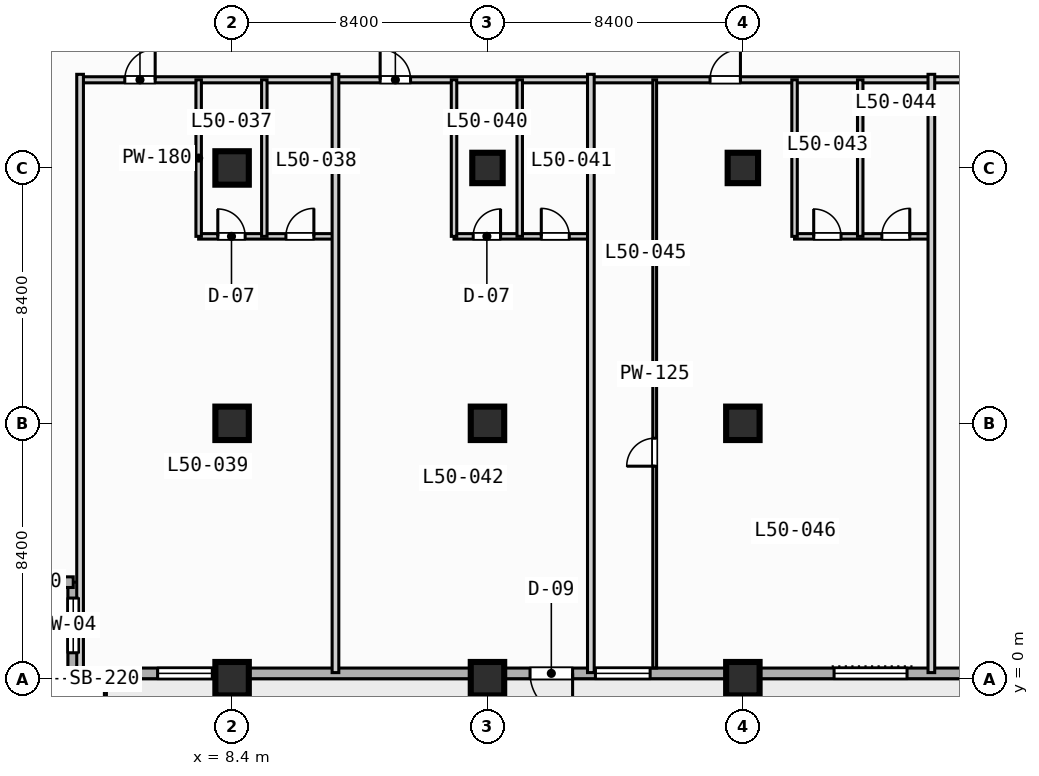
"""IFC4 building model, lengths in metres.
Left out: names, types, materials, properties, quantities, classifications, styles, units other than length and angle.
Written with IfcOpenShell. Run it as: python <this file> out.ifc"""

import sys

from ifc_helpers import new_model, si_unit, direction, frame, frame_2d, origin, origin_2d, place, context, subcontext, project, spatial, rectangle, extrude, element, fill, save


model = new_model("IFC4")
c1 = context("Model", 3, precision=1e-05, world=origin(), true_north=direction((0.0, 1.0)))
c2 = subcontext(c1, "Body", "Model", "MODEL_VIEW")
j1 = project(units=[si_unit("LENGTHUNIT", "METRE"), si_unit("PLANEANGLEUNIT", "RADIAN")], contexts=[c1])
p1 = place(None, origin())
s1 = spatial("IfcSite", under=j1, at=p1, CompositionType="ELEMENT")
p2 = place(p1, origin())
s2 = spatial("IfcBuilding", under=s1, at=p2, CompositionType="ELEMENT")
p3 = place(p2, frame((0.0, 0.0, 205.0)))
s3 = spatial("IfcBuildingStorey", under=s2, at=p3, CompositionType="ELEMENT", Elevation=205.0)
for number, where, z_axis, x_axis in (
    (1, (8.4, 0.0, 0.0), (0.0, 0.0, 1.0), (1.0, 0.0, 0.0)),
    (2, (8.4, 8.4, 0.0), (0.0, 0.0, 1.0), (1.0, 0.0, 0.0)),
    (3, (8.4, 16.8, 0.0), (0.0, 0.0, 1.0), (1.0, 0.0, 0.0)),
    (4, (16.8, 0.0, 0.0), (0.0, 0.0, 1.0), (1.0, 0.0, 0.0)),
    (5, (16.8, 8.4, 0.0), (0.0, 0.0, 1.0), (1.0, 0.0, 0.0)),
):
    element("IfcColumn", number, at=place(p3, frame(where, z_axis=z_axis, x_axis=x_axis)), inside=s3, PredefinedType="COLUMN", context=c2, shape_type="SweptSolid", body=[
        extrude(rectangle(XDim=1.1, YDim=1.1, at=origin_2d()), origin(), (0.0, 0.0, 1.0), 3.7),
    ])
p4 = place(p3, frame((16.8, 16.8, 0.0), z_axis=(0.0, 0.0, 1.0), x_axis=(1.0, 0.0, 0.0)))
e6 = element("IfcColumn", 6, at=p4, inside=s3, PredefinedType="COLUMN", context=c2, shape_type="SweptSolid", body=[
    extrude(rectangle(XDim=1.0, YDim=1.0, at=origin_2d()), origin(), (0.0, 0.0, 1.0), 3.7),
])
for number, where, z_axis, x_axis in (
    (7, (25.2, 0.0, 0.0), (0.0, 0.0, 1.0), (1.0, 0.0, 0.0)),
    (8, (25.2, 8.4, 0.0), (0.0, 0.0, 1.0), (1.0, 0.0, 0.0)),
):
    element("IfcColumn", number, at=place(p3, frame(where, z_axis=z_axis, x_axis=x_axis)), inside=s3, PredefinedType="COLUMN", context=c2, shape_type="SweptSolid", body=[
        extrude(rectangle(XDim=1.1, YDim=1.1, at=origin_2d()), origin(), (0.0, 0.0, 1.0), 3.7),
    ])
p5 = place(p3, frame((25.2, 16.8, 0.0), z_axis=(0.0, 0.0, 1.0), x_axis=(1.0, 0.0, 0.0)))
e9 = element("IfcColumn", 9, at=p5, inside=s3, PredefinedType="COLUMN", context=c2, shape_type="SweptSolid", body=[
    extrude(rectangle(XDim=1.0, YDim=1.0, at=origin_2d()), origin(), (0.0, 0.0, 1.0), 3.7),
])
p6 = place(p3, frame((3.175, 0.175, 0.0), z_axis=(0.0, 0.0, 1.0), x_axis=(0.0, 1.0, 0.0)))
e10 = element("IfcWall", 10, at=p6, inside=s3, PredefinedType="STANDARD", context=c2, shape_type="SweptSolid", body=[
    extrude(rectangle(XDim=3.0, YDim=0.35, at=frame_2d((1.5, 0.0))), origin(), (0.0, 0.0, 1.0), 3.47),
])
p7 = place(p6, frame((0.677, 0.0, 0.85)))
e11 = element("IfcOpeningElement", 11, at=p7, cuts=e10, PredefinedType="OPENING", context=c2, shape_type="SweptSolid", body=[
    extrude(rectangle(XDim=1.8, YDim=1.8, at=frame_2d((0.9, 0.9))), frame((0.0, 0.185, 0.0), z_axis=(0.0, -1.0, 0.0), x_axis=(1.0, 0.0, 0.0)), (0.0, 0.0, 1.0), 0.37),
])
p8 = place(p3, frame((3.175, 3.175, 0.0), z_axis=(0.0, 0.0, 1.0), x_axis=(-1.0, 0.0, 0.0)))
e12 = element("IfcWall", 12, at=p8, inside=s3, PredefinedType="STANDARD", context=c2, shape_type="SweptSolid", body=[
    extrude(rectangle(XDim=3.0, YDim=0.35, at=frame_2d((1.5, 0.0))), origin(), (0.0, 0.0, 1.0), 3.47),
])
p9 = place(p3, frame((72.425, 0.175, 0.0), z_axis=(0.0, 0.0, 1.0), x_axis=(-1.0, 0.0, 0.0)))
e13 = element("IfcWall", 13, at=p9, inside=s3, PredefinedType="STANDARD", context=c2, shape_type="SweptSolid", body=[
    extrude(rectangle(XDim=69.25, YDim=0.35, at=frame_2d((34.625, 0.0))), origin(), (0.0, 0.0, 1.0), 3.47),
])
p10 = place(p9, frame((52.825, 0.0, 0.0)))
e14 = element("IfcOpeningElement", 14, at=p10, cuts=e13, PredefinedType="OPENING", context=c2, shape_type="SweptSolid", body=[
    extrude(rectangle(XDim=1.4, YDim=2.2, at=frame_2d((0.7, 1.1))), frame((0.0, 0.185, 0.0), z_axis=(0.0, -1.0, 0.0), x_axis=(1.0, 0.0, 0.0)), (0.0, 0.0, 1.0), 0.37),
])
p11 = place(p9, frame((41.825, 0.0, 0.85)))
e15 = element("IfcOpeningElement", 15, at=p11, cuts=e13, PredefinedType="OPENING", context=c2, shape_type="SweptSolid", body=[
    extrude(rectangle(XDim=2.4, YDim=1.95, at=frame_2d((1.2, 0.975))), frame((0.0, 0.185, 0.0), z_axis=(0.0, -1.0, 0.0), x_axis=(1.0, 0.0, 0.0)), (0.0, 0.0, 1.0), 0.37),
])
p12 = place(p9, frame((33.725, 0.0, 0.85)))
e16 = element("IfcOpeningElement", 16, at=p12, cuts=e13, PredefinedType="OPENING", context=c2, shape_type="SweptSolid", body=[
    extrude(rectangle(XDim=1.8, YDim=1.8, at=frame_2d((0.9, 0.9))), frame((0.0, 0.185, 0.0), z_axis=(0.0, -1.0, 0.0), x_axis=(1.0, 0.0, 0.0)), (0.0, 0.0, 1.0), 0.37),
])
p13 = place(p9, frame((25.025, 0.0, 0.85)))
e17 = element("IfcOpeningElement", 17, at=p13, cuts=e13, PredefinedType="OPENING", context=c2, shape_type="SweptSolid", body=[
    extrude(rectangle(XDim=2.4, YDim=1.95, at=frame_2d((1.2, 0.975))), frame((0.0, 0.185, 0.0), z_axis=(0.0, -1.0, 0.0), x_axis=(1.0, 0.0, 0.0)), (0.0, 0.0, 1.0), 0.37),
])
p14 = place(p9, frame((64.675, 0.0, 0.85)))
e18 = element("IfcOpeningElement", 18, at=p14, cuts=e13, PredefinedType="OPENING", context=c2, shape_type="SweptSolid", body=[
    extrude(rectangle(XDim=1.8, YDim=1.8, at=frame_2d((0.9, 0.9))), frame((0.0, 0.185, 0.0), z_axis=(0.0, -1.0, 0.0), x_axis=(1.0, 0.0, 0.0)), (0.0, 0.0, 1.0), 0.37),
])
p15 = place(p9, frame((50.275, 0.0, 0.85)))
e19 = element("IfcOpeningElement", 19, at=p15, cuts=e13, PredefinedType="OPENING", context=c2, shape_type="SweptSolid", body=[
    extrude(rectangle(XDim=1.8, YDim=1.8, at=frame_2d((0.9, 0.9))), frame((0.0, 0.185, 0.0), z_axis=(0.0, -1.0, 0.0), x_axis=(1.0, 0.0, 0.0)), (0.0, 0.0, 1.0), 0.37),
])
p16 = place(p3, frame((3.4, 19.7, 0.0), z_axis=(0.0, 0.0, 1.0), x_axis=(1.0, 0.0, 0.0)))
e20 = element("IfcWall", 20, at=p16, inside=s3, PredefinedType="PARTITIONING", context=c2, shape_type="SweptSolid", body=[
    extrude(rectangle(XDim=35.8, YDim=0.2, at=frame_2d((17.9, 0.0))), origin(), (0.0, 0.0, 1.0), 3.47),
])
p17 = place(p16, frame((1.47, 0.0, 0.0)))
e21 = element("IfcOpeningElement", 21, at=p17, cuts=e20, PredefinedType="OPENING", context=c2, shape_type="SweptSolid", body=[
    extrude(rectangle(XDim=1.0, YDim=2.15, at=frame_2d((0.5, 1.075))), frame((0.0, 0.11, 0.0), z_axis=(0.0, -1.0, 0.0), x_axis=(1.0, 0.0, 0.0)), (0.0, 0.0, 1.0), 0.22),
])
p18 = place(p16, frame((9.87, 0.0, 0.0)))
e22 = element("IfcOpeningElement", 22, at=p18, cuts=e20, PredefinedType="OPENING", context=c2, shape_type="SweptSolid", body=[
    extrude(rectangle(XDim=1.0, YDim=2.15, at=frame_2d((0.5, 1.075))), frame((0.0, 0.11, 0.0), z_axis=(0.0, -1.0, 0.0), x_axis=(1.0, 0.0, 0.0)), (0.0, 0.0, 1.0), 0.22),
])
p19 = place(p16, frame((20.72, 0.0, 0.0)))
e23 = element("IfcOpeningElement", 23, at=p19, cuts=e20, PredefinedType="OPENING", context=c2, shape_type="SweptSolid", body=[
    extrude(rectangle(XDim=1.0, YDim=2.15, at=frame_2d((0.5, 1.075))), frame((0.0, 0.11, 0.0), z_axis=(0.0, -1.0, 0.0), x_axis=(1.0, 0.0, 0.0)), (0.0, 0.0, 1.0), 0.22),
])
p20 = place(p16, frame((29.17, 0.0, 0.0)))
e24 = element("IfcOpeningElement", 24, at=p20, cuts=e20, PredefinedType="OPENING", context=c2, shape_type="SweptSolid", body=[
    extrude(rectangle(XDim=1.0, YDim=2.15, at=frame_2d((0.5, 1.075))), frame((0.0, 0.11, 0.0), z_axis=(0.0, -1.0, 0.0), x_axis=(1.0, 0.0, 0.0)), (0.0, 0.0, 1.0), 0.22),
])
p21 = place(p3, frame((3.4, 0.2, 0.0), z_axis=(0.0, 0.0, 1.0), x_axis=(0.0, 1.0, 0.0)))
e25 = element("IfcWall", 25, at=p21, inside=s3, PredefinedType="PARTITIONING", context=c2, shape_type="SweptSolid", body=[
    extrude(rectangle(XDim=19.68, YDim=0.22, at=frame_2d((9.84, 0.0))), origin(), (0.0, 0.0, 1.0), 3.47),
])
p22 = place(p3, frame((7.3, 14.55, 0.0), z_axis=(0.0, 0.0, 1.0), x_axis=(1.0, 0.0, 0.0)))
e26 = element("IfcWall", 26, at=p22, inside=s3, PredefinedType="PLUMBINGWALL", context=c2, shape_type="SweptSolid", body=[
    extrude(rectangle(XDim=4.5, YDim=0.18, at=frame_2d((2.25, 0.0))), origin(), (0.0, 0.0, 1.0), 3.47),
])
p23 = place(p22, frame((0.63, 0.0, 0.0)))
e27 = element("IfcOpeningElement", 27, at=p23, cuts=e26, PredefinedType="OPENING", context=c2, shape_type="SweptSolid", body=[
    extrude(rectangle(XDim=0.9, YDim=2.1, at=frame_2d((0.45, 1.05))), frame((0.0, 0.1, 0.0), z_axis=(0.0, -1.0, 0.0), x_axis=(1.0, 0.0, 0.0)), (0.0, 0.0, 1.0), 0.2),
])
p24 = place(p22, frame((2.87, 0.0, 0.0)))
e28 = element("IfcOpeningElement", 28, at=p24, cuts=e26, PredefinedType="OPENING", context=c2, shape_type="SweptSolid", body=[
    extrude(rectangle(XDim=0.92, YDim=2.1, at=frame_2d((0.46, 1.05))), frame((0.0, 0.1, 0.0), z_axis=(0.0, -1.0, 0.0), x_axis=(1.0, 0.0, 0.0)), (0.0, 0.0, 1.0), 0.2),
])
for number, where, z_axis, x_axis in (
    (29, (7.3, 14.55, 0.0), (0.0, 0.0, 1.0), (0.0, 1.0, 0.0)),
    (30, (9.46, 14.55, 0.0), (0.0, 0.0, 1.0), (0.0, 1.0, 0.0)),
):
    element("IfcWall", number, at=place(p3, frame(where, z_axis=z_axis, x_axis=x_axis)), inside=s3, PredefinedType="PLUMBINGWALL", context=c2, shape_type="SweptSolid", body=[
        extrude(rectangle(XDim=5.15, YDim=0.18, at=frame_2d((2.575, 0.0))), origin(), (0.0, 0.0, 1.0), 3.47),
    ])
p25 = place(p3, frame((11.8, 0.2, 0.0), z_axis=(0.0, 0.0, 1.0), x_axis=(0.0, 1.0, 0.0)))
e31 = element("IfcWall", 31, at=p25, inside=s3, PredefinedType="PARTITIONING", context=c2, shape_type="SweptSolid", body=[
    extrude(rectangle(XDim=19.68, YDim=0.22, at=frame_2d((9.84, 0.0))), origin(), (0.0, 0.0, 1.0), 3.47),
])
p26 = place(p3, frame((15.7, 14.55, 0.0), z_axis=(0.0, 0.0, 1.0), x_axis=(1.0, 0.0, 0.0)))
e32 = element("IfcWall", 32, at=p26, inside=s3, PredefinedType="PLUMBINGWALL", context=c2, shape_type="SweptSolid", body=[
    extrude(rectangle(XDim=4.5, YDim=0.18, at=frame_2d((2.25, 0.0))), origin(), (0.0, 0.0, 1.0), 3.47),
])
p27 = place(p26, frame((0.63, 0.0, 0.0)))
e33 = element("IfcOpeningElement", 33, at=p27, cuts=e32, PredefinedType="OPENING", context=c2, shape_type="SweptSolid", body=[
    extrude(rectangle(XDim=0.9, YDim=2.1, at=frame_2d((0.45, 1.05))), frame((0.0, 0.1, 0.0), z_axis=(0.0, -1.0, 0.0), x_axis=(1.0, 0.0, 0.0)), (0.0, 0.0, 1.0), 0.2),
])
p28 = place(p26, frame((2.87, 0.0, 0.0)))
e34 = element("IfcOpeningElement", 34, at=p28, cuts=e32, PredefinedType="OPENING", context=c2, shape_type="SweptSolid", body=[
    extrude(rectangle(XDim=0.92, YDim=2.1, at=frame_2d((0.46, 1.05))), frame((0.0, 0.1, 0.0), z_axis=(0.0, -1.0, 0.0), x_axis=(1.0, 0.0, 0.0)), (0.0, 0.0, 1.0), 0.2),
])
for number, where, z_axis, x_axis in (
    (35, (15.7, 14.55, 0.0), (0.0, 0.0, 1.0), (0.0, 1.0, 0.0)),
    (36, (17.86, 14.55, 0.0), (0.0, 0.0, 1.0), (0.0, 1.0, 0.0)),
):
    element("IfcWall", number, at=place(p3, frame(where, z_axis=z_axis, x_axis=x_axis)), inside=s3, PredefinedType="PLUMBINGWALL", context=c2, shape_type="SweptSolid", body=[
        extrude(rectangle(XDim=5.15, YDim=0.18, at=frame_2d((2.575, 0.0))), origin(), (0.0, 0.0, 1.0), 3.47),
    ])
p29 = place(p3, frame((20.2, 0.2, 0.0), z_axis=(0.0, 0.0, 1.0), x_axis=(0.0, 1.0, 0.0)))
e37 = element("IfcWall", 37, at=p29, inside=s3, PredefinedType="PARTITIONING", context=c2, shape_type="SweptSolid", body=[
    extrude(rectangle(XDim=19.68, YDim=0.22, at=frame_2d((9.84, 0.0))), origin(), (0.0, 0.0, 1.0), 3.47),
])
p30 = place(p3, frame((26.9, 14.55, 0.0), z_axis=(0.0, 0.0, 1.0), x_axis=(1.0, 0.0, 0.0)))
e38 = element("IfcWall", 38, at=p30, inside=s3, PredefinedType="PLUMBINGWALL", context=c2, shape_type="SweptSolid", body=[
    extrude(rectangle(XDim=4.5, YDim=0.18, at=frame_2d((2.25, 0.0))), origin(), (0.0, 0.0, 1.0), 3.47),
])
p31 = place(p30, frame((0.63, 0.0, 0.0)))
e39 = element("IfcOpeningElement", 39, at=p31, cuts=e38, PredefinedType="OPENING", context=c2, shape_type="SweptSolid", body=[
    extrude(rectangle(XDim=0.9, YDim=2.1, at=frame_2d((0.45, 1.05))), frame((0.0, 0.1, 0.0), z_axis=(0.0, -1.0, 0.0), x_axis=(1.0, 0.0, 0.0)), (0.0, 0.0, 1.0), 0.2),
])
p32 = place(p30, frame((2.87, 0.0, 0.0)))
e40 = element("IfcOpeningElement", 40, at=p32, cuts=e38, PredefinedType="OPENING", context=c2, shape_type="SweptSolid", body=[
    extrude(rectangle(XDim=0.92, YDim=2.1, at=frame_2d((0.46, 1.05))), frame((0.0, 0.1, 0.0), z_axis=(0.0, -1.0, 0.0), x_axis=(1.0, 0.0, 0.0)), (0.0, 0.0, 1.0), 0.2),
])
for number, where, z_axis, x_axis in (
    (41, (26.9, 14.55, 0.0), (0.0, 0.0, 1.0), (0.0, 1.0, 0.0)),
    (42, (29.06, 14.55, 0.0), (0.0, 0.0, 1.0), (0.0, 1.0, 0.0)),
):
    element("IfcWall", number, at=place(p3, frame(where, z_axis=z_axis, x_axis=x_axis)), inside=s3, PredefinedType="PLUMBINGWALL", context=c2, shape_type="SweptSolid", body=[
        extrude(rectangle(XDim=5.15, YDim=0.18, at=frame_2d((2.575, 0.0))), origin(), (0.0, 0.0, 1.0), 3.47),
    ])
p33 = place(p3, frame((22.3, 0.35, 0.0), z_axis=(0.0, 0.0, 1.0), x_axis=(0.0, 1.0, 0.0)))
e43 = element("IfcWall", 43, at=p33, inside=s3, PredefinedType="PARTITIONING", context=c2, shape_type="SweptSolid", body=[
    extrude(rectangle(XDim=19.35, YDim=0.125, at=frame_2d((9.675, 0.0))), origin(), (0.0, 0.0, 1.0), 3.47),
])
p34 = place(p33, frame((6.64, 0.0, 0.0)))
e44 = element("IfcOpeningElement", 44, at=p34, cuts=e43, PredefinedType="OPENING", context=c2, shape_type="SweptSolid", body=[
    extrude(rectangle(XDim=0.92, YDim=2.1, at=frame_2d((0.46, 1.05))), frame((0.0, 0.073, 0.0), z_axis=(0.0, -1.0, 0.0), x_axis=(1.0, 0.0, 0.0)), (0.0, 0.0, 1.0), 0.145),
])
p35 = place(p3, frame((31.4, 0.2, 0.0), z_axis=(0.0, 0.0, 1.0), x_axis=(0.0, 1.0, 0.0)))
e45 = element("IfcWall", 45, at=p35, inside=s3, PredefinedType="PARTITIONING", context=c2, shape_type="SweptSolid", body=[
    extrude(rectangle(XDim=19.68, YDim=0.22, at=frame_2d((9.84, 0.0))), origin(), (0.0, 0.0, 1.0), 3.47),
])
p36 = place(p7, origin())
e46 = element("IfcWindow", 46, at=p36, inside=s3, PartitioningType="SINGLE_PANEL", PredefinedType="WINDOW", context=c2, shape_type="SweptSolid", body=[
    extrude(rectangle(XDim=1.8, YDim=1.8, at=frame_2d((0.9, 0.9))), frame((0.0, 0.03, 0.0), z_axis=(0.0, -1.0, 0.0), x_axis=(1.0, 0.0, 0.0)), (0.0, 0.0, 1.0), 0.06),
])
fill(e11, e46)
p37 = place(p10, origin())
e47 = element("IfcDoor", 47, at=p37, inside=s3, OperationType="SINGLE_SWING_LEFT", PredefinedType="DOOR", context=c2, shape_type="SweptSolid", body=[
    extrude(rectangle(XDim=1.4, YDim=2.2, at=frame_2d((0.7, 1.1))), frame((0.0, 0.025, 0.0), z_axis=(0.0, -1.0, 0.0), x_axis=(1.0, 0.0, 0.0)), (0.0, 0.0, 1.0), 0.05),
])
fill(e14, e47)
p38 = place(p11, origin())
e48 = element("IfcWindow", 48, at=p38, inside=s3, PartitioningType="SINGLE_PANEL", PredefinedType="WINDOW", context=c2, shape_type="SweptSolid", body=[
    extrude(rectangle(XDim=2.4, YDim=1.95, at=frame_2d((1.2, 0.975))), frame((0.0, 0.03, 0.0), z_axis=(0.0, -1.0, 0.0), x_axis=(1.0, 0.0, 0.0)), (0.0, 0.0, 1.0), 0.06),
])
fill(e15, e48)
p39 = place(p14, origin())
e49 = element("IfcWindow", 49, at=p39, inside=s3, PartitioningType="SINGLE_PANEL", PredefinedType="WINDOW", context=c2, shape_type="SweptSolid", body=[
    extrude(rectangle(XDim=1.8, YDim=1.8, at=frame_2d((0.9, 0.9))), frame((0.0, 0.03, 0.0), z_axis=(0.0, -1.0, 0.0), x_axis=(1.0, 0.0, 0.0)), (0.0, 0.0, 1.0), 0.06),
])
fill(e18, e49)
p40 = place(p15, origin())
e50 = element("IfcWindow", 50, at=p40, inside=s3, PartitioningType="SINGLE_PANEL", PredefinedType="WINDOW", context=c2, shape_type="SweptSolid", body=[
    extrude(rectangle(XDim=1.8, YDim=1.8, at=frame_2d((0.9, 0.9))), frame((0.0, 0.03, 0.0), z_axis=(0.0, -1.0, 0.0), x_axis=(1.0, 0.0, 0.0)), (0.0, 0.0, 1.0), 0.06),
])
fill(e19, e50)
p41 = place(p17, origin())
e51 = element("IfcDoor", 51, at=p41, inside=s3, OperationType="SINGLE_SWING_RIGHT", PredefinedType="DOOR", context=c2, shape_type="SweptSolid", body=[
    extrude(rectangle(XDim=1.0, YDim=2.15, at=frame_2d((0.5, 1.075))), frame((0.0, 0.025, 0.0), z_axis=(0.0, -1.0, 0.0), x_axis=(1.0, 0.0, 0.0)), (0.0, 0.0, 1.0), 0.05),
])
fill(e21, e51)
p42 = place(p18, origin())
e52 = element("IfcDoor", 52, at=p42, inside=s3, OperationType="SINGLE_SWING_LEFT", PredefinedType="DOOR", context=c2, shape_type="SweptSolid", body=[
    extrude(rectangle(XDim=1.0, YDim=2.15, at=frame_2d((0.5, 1.075))), frame((0.0, 0.025, 0.0), z_axis=(0.0, -1.0, 0.0), x_axis=(1.0, 0.0, 0.0)), (0.0, 0.0, 1.0), 0.05),
])
fill(e22, e52)
p43 = place(p19, origin())
e53 = element("IfcDoor", 53, at=p43, inside=s3, OperationType="SINGLE_SWING_RIGHT", PredefinedType="DOOR", context=c2, shape_type="SweptSolid", body=[
    extrude(rectangle(XDim=1.0, YDim=2.15, at=frame_2d((0.5, 1.075))), frame((0.0, 0.025, 0.0), z_axis=(0.0, -1.0, 0.0), x_axis=(1.0, 0.0, 0.0)), (0.0, 0.0, 1.0), 0.05),
])
fill(e23, e53)
p44 = place(p23, origin())
e54 = element("IfcDoor", 54, at=p44, inside=s3, OperationType="SINGLE_SWING_LEFT", PredefinedType="DOOR", context=c2, shape_type="SweptSolid", body=[
    extrude(rectangle(XDim=0.9, YDim=2.1, at=frame_2d((0.45, 1.05))), frame((0.0, 0.025, 0.0), z_axis=(0.0, -1.0, 0.0), x_axis=(1.0, 0.0, 0.0)), (0.0, 0.0, 1.0), 0.05),
])
fill(e27, e54)
p45 = place(p24, origin())
e55 = element("IfcDoor", 55, at=p45, inside=s3, OperationType="SINGLE_SWING_RIGHT", PredefinedType="DOOR", context=c2, shape_type="SweptSolid", body=[
    extrude(rectangle(XDim=0.92, YDim=2.1, at=frame_2d((0.46, 1.05))), frame((0.0, 0.025, 0.0), z_axis=(0.0, -1.0, 0.0), x_axis=(1.0, 0.0, 0.0)), (0.0, 0.0, 1.0), 0.05),
])
fill(e28, e55)
p46 = place(p27, origin())
e56 = element("IfcDoor", 56, at=p46, inside=s3, OperationType="SINGLE_SWING_RIGHT", PredefinedType="DOOR", context=c2, shape_type="SweptSolid", body=[
    extrude(rectangle(XDim=0.9, YDim=2.1, at=frame_2d((0.45, 1.05))), frame((0.0, 0.025, 0.0), z_axis=(0.0, -1.0, 0.0), x_axis=(1.0, 0.0, 0.0)), (0.0, 0.0, 1.0), 0.05),
])
fill(e33, e56)
p47 = place(p28, origin())
e57 = element("IfcDoor", 57, at=p47, inside=s3, OperationType="SINGLE_SWING_LEFT", PredefinedType="DOOR", context=c2, shape_type="SweptSolid", body=[
    extrude(rectangle(XDim=0.92, YDim=2.1, at=frame_2d((0.46, 1.05))), frame((0.0, 0.025, 0.0), z_axis=(0.0, -1.0, 0.0), x_axis=(1.0, 0.0, 0.0)), (0.0, 0.0, 1.0), 0.05),
])
fill(e34, e57)
p48 = place(p31, origin())
e58 = element("IfcDoor", 58, at=p48, inside=s3, OperationType="SINGLE_SWING_LEFT", PredefinedType="DOOR", context=c2, shape_type="SweptSolid", body=[
    extrude(rectangle(XDim=0.9, YDim=2.1, at=frame_2d((0.45, 1.05))), frame((0.0, 0.025, 0.0), z_axis=(0.0, -1.0, 0.0), x_axis=(1.0, 0.0, 0.0)), (0.0, 0.0, 1.0), 0.05),
])
fill(e39, e58)
p49 = place(p32, origin())
e59 = element("IfcDoor", 59, at=p49, inside=s3, OperationType="SINGLE_SWING_RIGHT", PredefinedType="DOOR", context=c2, shape_type="SweptSolid", body=[
    extrude(rectangle(XDim=0.92, YDim=2.1, at=frame_2d((0.46, 1.05))), frame((0.0, 0.025, 0.0), z_axis=(0.0, -1.0, 0.0), x_axis=(1.0, 0.0, 0.0)), (0.0, 0.0, 1.0), 0.05),
])
fill(e40, e59)
p50 = place(p34, origin())
e60 = element("IfcDoor", 60, at=p50, inside=s3, OperationType="SINGLE_SWING_LEFT", PredefinedType="DOOR", context=c2, shape_type="SweptSolid", body=[
    extrude(rectangle(XDim=0.92, YDim=2.1, at=frame_2d((0.46, 1.05))), frame((0.0, 0.025, 0.0), z_axis=(0.0, -1.0, 0.0), x_axis=(1.0, 0.0, 0.0)), (0.0, 0.0, 1.0), 0.05),
])
fill(e44, e60)
save(model, sys.argv[1])
